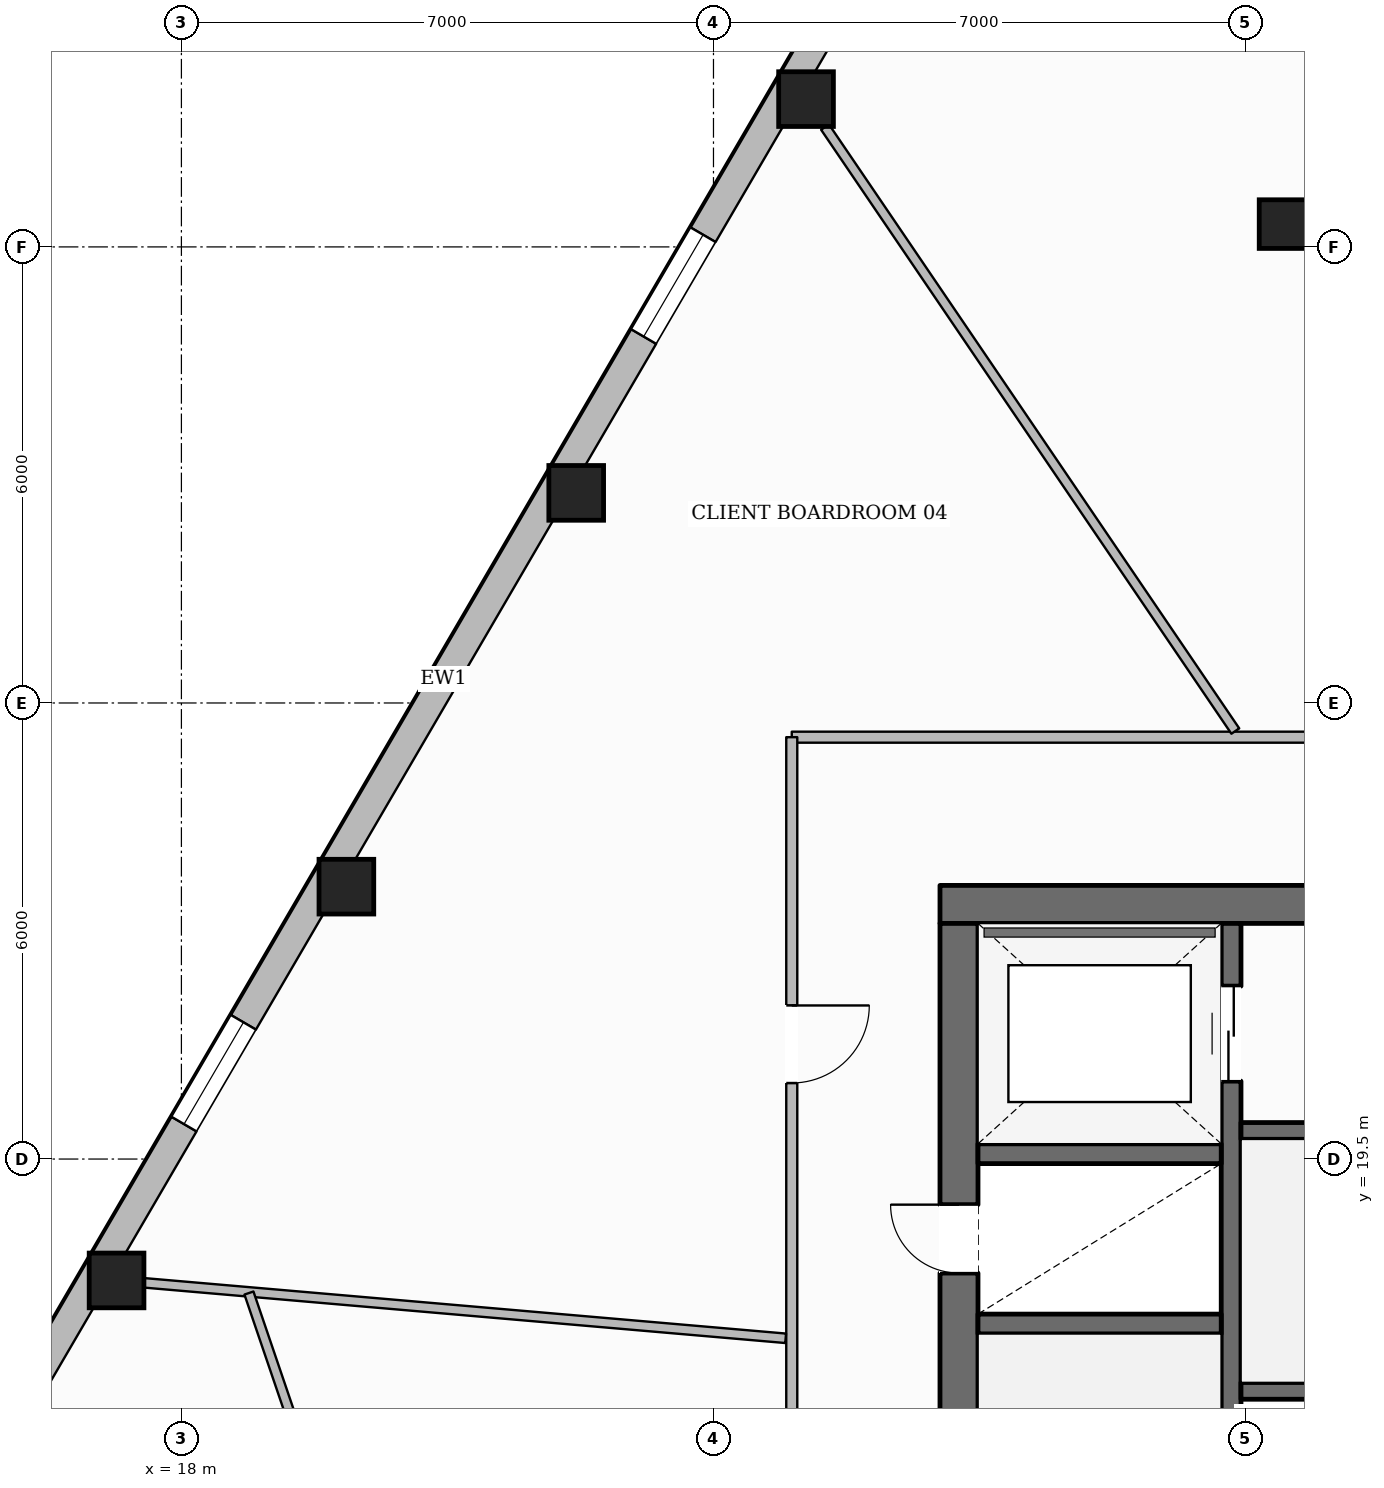
"""IFC4 building model, lengths in metres.
Left out: names, types, materials, properties, quantities, classifications, styles, units other than length and angle.
Written with IfcOpenShell. Run it as: python <this file> out.ifc"""

import sys

from ifc_helpers import new_model, si_unit, direction, frame, frame_2d, origin, origin_2d, place, context, subcontext, project, spatial, rectangle, hollow_rectangle, extrude, element, fill, save


model = new_model("IFC4")
c1 = context("Model", 3, precision=1e-05, world=origin(), true_north=direction((0.0, 1.0)))
c2 = subcontext(c1, "Body", "Model", "MODEL_VIEW")
j1 = project(units=[si_unit("LENGTHUNIT", "METRE"), si_unit("PLANEANGLEUNIT", "RADIAN")], contexts=[c1])
p1 = place(None, origin())
s1 = spatial("IfcSite", under=j1, at=p1, CompositionType="ELEMENT")
p2 = place(p1, origin())
s2 = spatial("IfcBuilding", under=s1, at=p2, CompositionType="ELEMENT")
p3 = place(p2, frame((0.0, 0.0, 127.85)))
s3 = spatial("IfcBuildingStorey", under=s2, at=p3, CompositionType="ELEMENT", Elevation=127.85)
p4 = place(p3, frame((27.98, 22.85, 0.0), z_axis=(0.0, 0.0, 1.0), x_axis=(1.0, 0.0, 0.0)))
e1 = element("IfcWall", 1, at=p4, inside=s3, PredefinedType="SOLIDWALL", context=c2, shape_type="SweptSolid", body=[
    extrude(rectangle(XDim=20.04, YDim=0.5, at=frame_2d((10.02, 0.0))), origin(), (0.0, 0.0, 1.0), 3.6),
])
p5 = place(p4, frame((6.295, 0.0, 0.0)))
e2 = element("IfcOpeningElement", 2, at=p5, cuts=e1, PredefinedType="OPENING", context=c2, shape_type="SweptSolid", body=[
    extrude(rectangle(XDim=1.05, YDim=2.15, at=frame_2d((0.525, 1.075))), frame((0.0, 0.26, 0.0), z_axis=(0.0, -1.0, 0.0), x_axis=(1.0, 0.0, 0.0)), (0.0, 0.0, 1.0), 0.52),
])
p6 = place(p4, frame((12.695, 0.0, 0.0)))
e3 = element("IfcOpeningElement", 3, at=p6, cuts=e1, PredefinedType="OPENING", context=c2, shape_type="SweptSolid", body=[
    extrude(rectangle(XDim=1.05, YDim=2.15, at=frame_2d((0.525, 1.075))), frame((0.0, 0.26, 0.0), z_axis=(0.0, -1.0, 0.0), x_axis=(1.0, 0.0, 0.0)), (0.0, 0.0, 1.0), 0.52),
])
p7 = place(p3, frame((28.23, 9.6, 0.0), z_axis=(0.0, 0.0, 1.0), x_axis=(0.0, 1.0, 0.0)))
e4 = element("IfcWall", 4, at=p7, inside=s3, PredefinedType="SOLIDWALL", context=c2, shape_type="SweptSolid", body=[
    extrude(rectangle(XDim=13.0, YDim=0.5, at=frame_2d((6.5, 0.0))), origin(), (0.0, 0.0, 1.0), 3.6),
])
p8 = place(p7, frame((0.2, 0.0, 0.0)))
e5 = element("IfcOpeningElement", 5, at=p8, cuts=e4, PredefinedType="OPENING", context=c2, shape_type="SweptSolid", body=[
    extrude(rectangle(XDim=1.1, YDim=2.15, at=frame_2d((0.55, 1.075))), frame((0.0, 0.26, 0.0), z_axis=(0.0, -1.0, 0.0), x_axis=(1.0, 0.0, 0.0)), (0.0, 0.0, 1.0), 0.52),
])
p9 = place(p7, frame((8.4, 0.0, 0.0)))
e6 = element("IfcOpeningElement", 6, at=p9, cuts=e4, PredefinedType="OPENING", context=c2, shape_type="SweptSolid", body=[
    extrude(rectangle(XDim=0.9, YDim=2.1, at=frame_2d((0.45, 1.05))), frame((0.0, 0.26, 0.0), z_axis=(0.0, -1.0, 0.0), x_axis=(1.0, 0.0, 0.0)), (0.0, 0.0, 1.0), 0.52),
])
p10 = place(p3, frame((31.81, 9.6, 0.0), z_axis=(0.0, 0.0, 1.0), x_axis=(0.0, 1.0, 0.0)))
e7 = element("IfcWall", 7, at=p10, inside=s3, PredefinedType="SHEAR", context=c2, shape_type="SweptSolid", body=[
    extrude(rectangle(XDim=13.0, YDim=0.26, at=frame_2d((6.5, 0.0))), origin(), (0.0, 0.0, 1.0), 3.6),
])
p11 = place(p10, frame((10.925, 0.0, 0.0)))
e8 = element("IfcOpeningElement", 8, at=p11, cuts=e7, PredefinedType="OPENING", context=c2, shape_type="SweptSolid", body=[
    extrude(rectangle(XDim=1.25, YDim=2.25, at=frame_2d((0.625, 1.125))), frame((0.0, 0.14, 0.0), z_axis=(0.0, -1.0, 0.0), x_axis=(1.0, 0.0, 0.0)), (0.0, 0.0, 1.0), 0.28),
])
for number, where, z_axis, x_axis in (
    (9, (28.48, 17.33, 0.0), (0.0, 0.0, 1.0), (1.0, 0.0, 0.0)),
    (10, (28.48, 19.57, 0.0), (0.0, 0.0, 1.0), (1.0, 0.0, 0.0)),
):
    element("IfcWall", number, at=place(p3, frame(where, z_axis=z_axis, x_axis=x_axis)), inside=s3, PredefinedType="SHEAR", context=c2, shape_type="SweptSolid", body=[
        extrude(rectangle(XDim=3.2, YDim=0.26, at=frame_2d((1.6, 0.0))), origin(), (0.0, 0.0, 1.0), 3.6),
    ])
p12 = place(p3, frame((31.94, 19.87, 0.0), z_axis=(0.0, 0.0, 1.0), x_axis=(1.0, 0.0, 0.0)))
e11 = element("IfcWall", 11, at=p12, inside=s3, PredefinedType="SOLIDWALL", context=c2, shape_type="SweptSolid", body=[
    extrude(rectangle(XDim=12.12, YDim=0.22, at=frame_2d((6.06, 0.0))), origin(), (0.0, 0.0, 1.0), 3.6),
])
p13 = place(p12, frame((6.3, 0.0, 0.0)))
e12 = element("IfcOpeningElement", 12, at=p13, cuts=e11, PredefinedType="OPENING", context=c2, shape_type="SweptSolid", body=[
    extrude(rectangle(XDim=1.1, YDim=2.15, at=frame_2d((0.55, 1.075))), frame((0.0, 0.12, 0.0), z_axis=(0.0, -1.0, 0.0), x_axis=(1.0, 0.0, 0.0)), (0.0, 0.0, 1.0), 0.24),
])
p14 = place(p12, frame((9.51, 0.0, 0.0)))
e13 = element("IfcOpeningElement", 13, at=p14, cuts=e11, PredefinedType="OPENING", context=c2, shape_type="SweptSolid", body=[
    extrude(rectangle(XDim=0.9, YDim=2.1, at=frame_2d((0.45, 1.05))), frame((0.0, 0.12, 0.0), z_axis=(0.0, -1.0, 0.0), x_axis=(1.0, 0.0, 0.0)), (0.0, 0.0, 1.0), 0.24),
])
p15 = place(p3, frame((31.94, 16.45, 0.0), z_axis=(0.0, 0.0, 1.0), x_axis=(1.0, 0.0, 0.0)))
e14 = element("IfcWall", 14, at=p15, inside=s3, PredefinedType="SOLIDWALL", context=c2, shape_type="SweptSolid", body=[
    extrude(rectangle(XDim=12.12, YDim=0.22, at=frame_2d((6.06, 0.0))), origin(), (0.0, 0.0, 1.0), 3.6),
])
for number, where, z_axis, x_axis in (
    (15, (26.218, 33.445, 0.0), (0.0, 0.0, 1.0), (1.0, 0.0, 0.0)),
    (16, (23.194, 28.264, 0.0), (0.0, 0.0, 1.0), (1.0, 0.0, 0.0)),
    (17, (20.17, 23.083, 0.0), (0.0, 0.0, 1.0), (1.0, 0.0, 0.0)),
    (18, (17.147, 17.903, 0.0), (0.0, 0.0, 1.0), (1.0, 0.0, 0.0)),
):
    element("IfcColumn", number, at=place(p3, frame(where, z_axis=z_axis, x_axis=x_axis)), inside=s3, PredefinedType="COLUMN", context=c2, shape_type="SweptSolid", body=[
        extrude(hollow_rectangle(XDim=0.72, YDim=0.72, WallThickness=0.032, at=origin_2d()), origin(), (0.0, 0.0, 1.0), 3.6),
    ])
p16 = place(p3, frame((32.5, 31.8, 0.0), z_axis=(0.0, 0.0, 1.0), x_axis=(1.0, 0.0, 0.0)))
e19 = element("IfcColumn", 19, at=p16, inside=s3, PredefinedType="COLUMN", context=c2, shape_type="SweptSolid", body=[
    extrude(hollow_rectangle(XDim=0.64, YDim=0.64, WallThickness=0.028, at=origin_2d()), origin(), (0.0, 0.0, 1.0), 3.6),
])
p17 = place(p3, frame((13.648, 12.443, 0.0), z_axis=(0.0, 0.0, 1.0), x_axis=(0.504070270963, 0.863662643589, 0.0)))
e20 = element("IfcWall", 20, at=p17, inside=s3, PredefinedType="STANDARD", context=c2, shape_type="SweptSolid", body=[
    extrude(rectangle(XDim=36.948, YDim=0.38, at=frame_2d((18.474, 0.0))), origin(), (0.0, 0.0, 1.0), 3.059),
])
p18 = place(p17, frame((27.111, 0.0, 0.0)))
e21 = element("IfcOpeningElement", 21, at=p18, cuts=e20, PredefinedType="OPENING", context=c2, shape_type="SweptSolid", body=[
    extrude(rectangle(XDim=1.0, YDim=2.2, at=frame_2d((0.5, 1.1))), frame((0.0, 0.2, 0.0), z_axis=(0.0, -1.0, 0.0), x_axis=(1.0, 0.0, 0.0)), (0.0, 0.0, 1.0), 0.4),
])
p19 = place(p17, frame((32.697, 0.0, 0.65)))
e22 = element("IfcOpeningElement", 22, at=p19, cuts=e20, PredefinedType="OPENING", context=c2, shape_type="SweptSolid", body=[
    extrude(rectangle(XDim=1.55, YDim=1.75, at=frame_2d((0.775, 0.875))), frame((0.0, 0.2, 0.0), z_axis=(0.0, -1.0, 0.0), x_axis=(1.0, 0.0, 0.0)), (0.0, 0.0, 1.0), 0.4),
])
p20 = place(p17, frame((20.7, 0.0, 0.65)))
e23 = element("IfcOpeningElement", 23, at=p20, cuts=e20, PredefinedType="OPENING", context=c2, shape_type="SweptSolid", body=[
    extrude(rectangle(XDim=1.55, YDim=1.75, at=frame_2d((0.775, 0.875))), frame((0.0, 0.2, 0.0), z_axis=(0.0, -1.0, 0.0), x_axis=(1.0, 0.0, 0.0)), (0.0, 0.0, 1.0), 0.4),
])
p21 = place(p17, frame((8.704, 0.0, 0.65)))
e24 = element("IfcOpeningElement", 24, at=p21, cuts=e20, PredefinedType="OPENING", context=c2, shape_type="SweptSolid", body=[
    extrude(rectangle(XDim=1.55, YDim=1.75, at=frame_2d((0.775, 0.875))), frame((0.0, 0.2, 0.0), z_axis=(0.0, -1.0, 0.0), x_axis=(1.0, 0.0, 0.0)), (0.0, 0.0, 1.0), 0.4),
])
p22 = place(p17, frame((2.705, 0.0, 0.65)))
e25 = element("IfcOpeningElement", 25, at=p22, cuts=e20, PredefinedType="OPENING", context=c2, shape_type="SweptSolid", body=[
    extrude(rectangle(XDim=1.55, YDim=1.75, at=frame_2d((0.775, 0.875))), frame((0.0, 0.2, 0.0), z_axis=(0.0, -1.0, 0.0), x_axis=(1.0, 0.0, 0.0)), (0.0, 0.0, 1.0), 0.4),
])
p23 = place(p3, frame((49.97, 25.05, 0.0), z_axis=(0.0, 0.0, 1.0), x_axis=(-1.0, 0.0, 0.0)))
e26 = element("IfcWall", 26, at=p23, inside=s3, PredefinedType="PARTITIONING", context=c2, shape_type="SweptSolid", body=[
    extrude(rectangle(XDim=23.94, YDim=0.145, at=frame_2d((11.97, 0.0))), origin(), (0.0, 0.0, 1.0), 3.6),
])
p24 = place(p23, frame((3.582, 0.0, 0.0)))
e27 = element("IfcOpeningElement", 27, at=p24, cuts=e26, PredefinedType="OPENING", context=c2, shape_type="SweptSolid", body=[
    extrude(rectangle(XDim=1.02, YDim=2.15, at=frame_2d((0.51, 1.075))), frame((0.0, 0.083, 0.0), z_axis=(0.0, -1.0, 0.0), x_axis=(1.0, 0.0, 0.0)), (0.0, 0.0, 1.0), 0.165),
])
p25 = place(p23, frame((12.535, 0.0, 0.0)))
e28 = element("IfcOpeningElement", 28, at=p25, cuts=e26, PredefinedType="OPENING", context=c2, shape_type="SweptSolid", body=[
    extrude(rectangle(XDim=1.4, YDim=2.2, at=frame_2d((0.7, 1.1))), frame((0.0, 0.083, 0.0), z_axis=(0.0, -1.0, 0.0), x_axis=(1.0, 0.0, 0.0)), (0.0, 0.0, 1.0), 0.165),
])
p26 = place(p3, frame((26.03, 25.05, 0.0), z_axis=(0.0, 0.0, 1.0), x_axis=(0.0, -1.0, 0.0)))
e29 = element("IfcWall", 29, at=p26, inside=s3, PredefinedType="PARTITIONING", context=c2, shape_type="SweptSolid", body=[
    extrude(rectangle(XDim=17.9, YDim=0.145, at=frame_2d((8.95, 0.0))), origin(), (0.0, 0.0, 1.0), 3.288),
])
p27 = place(p26, frame((3.53, 0.0, 0.0)))
e30 = element("IfcOpeningElement", 30, at=p27, cuts=e29, PredefinedType="OPENING", context=c2, shape_type="SweptSolid", body=[
    extrude(rectangle(XDim=1.02, YDim=2.15, at=frame_2d((0.51, 1.075))), frame((0.0, 0.083, 0.0), z_axis=(0.0, -1.0, 0.0), x_axis=(1.0, 0.0, 0.0)), (0.0, 0.0, 1.0), 0.165),
])
p28 = place(p26, frame((12.309, 0.0, 0.0)))
e31 = element("IfcOpeningElement", 31, at=p28, cuts=e29, PredefinedType="OPENING", context=c2, shape_type="SweptSolid", body=[
    extrude(rectangle(XDim=1.02, YDim=2.15, at=frame_2d((0.51, 1.075))), frame((0.0, 0.083, 0.0), z_axis=(0.0, -1.0, 0.0), x_axis=(1.0, 0.0, 0.0)), (0.0, 0.0, 1.0), 0.165),
])
p29 = place(p3, frame((31.865, 25.131, 0.0), z_axis=(0.0, 0.0, 1.0), x_axis=(-0.561922740885, 0.827189720243, 0.0)))
e32 = element("IfcWall", 32, at=p29, inside=s3, PredefinedType="PARTITIONING", context=c2, shape_type="SweptSolid", body=[
    extrude(rectangle(XDim=9.606, YDim=0.125, at=frame_2d((4.803, 0.0))), origin(), (0.0, 0.0, 1.0), 3.6),
])
p30 = place(p3, frame((25.949, 17.142, 0.0), z_axis=(0.0, 0.0, 1.0), x_axis=(-0.996283209421, 0.086138067226, 0.0)))
e33 = element("IfcWall", 33, at=p30, inside=s3, PredefinedType="PARTITIONING", context=c2, shape_type="SweptSolid", body=[
    extrude(rectangle(XDim=8.466, YDim=0.125, at=frame_2d((4.233, 0.0))), origin(), (0.0, 0.0, 1.0), 3.141),
])
p31 = place(p3, frame((18.889, 17.737, 0.0), z_axis=(0.0, 0.0, 1.0), x_axis=(0.322427692705, -0.946594096209, 0.0)))
e34 = element("IfcWall", 34, at=p31, inside=s3, PredefinedType="PARTITIONING", context=c2, shape_type="SweptSolid", body=[
    extrude(rectangle(XDim=15.848, YDim=0.125, at=frame_2d((7.924, 0.0))), origin(), (0.0, 0.0, 1.0), 3.6),
])
p32 = place(p31, frame((7.528, 0.0, 0.0)))
e35 = element("IfcOpeningElement", 35, at=p32, cuts=e34, PredefinedType="OPENING", context=c2, shape_type="SweptSolid", body=[
    extrude(rectangle(XDim=1.02, YDim=2.15, at=frame_2d((0.51, 1.075))), frame((0.0, 0.073, 0.0), z_axis=(0.0, -1.0, 0.0), x_axis=(1.0, 0.0, 0.0)), (0.0, 0.0, 1.0), 0.145),
])
p33 = place(p20, origin())
e36 = element("IfcWindow", 36, at=p33, inside=s3, PartitioningType="SINGLE_PANEL", PredefinedType="WINDOW", context=c2, shape_type="SweptSolid", body=[
    extrude(rectangle(XDim=1.55, YDim=1.75, at=frame_2d((0.775, 0.875))), frame((0.0, 0.03, 0.0), z_axis=(0.0, -1.0, 0.0), x_axis=(1.0, 0.0, 0.0)), (0.0, 0.0, 1.0), 0.06),
])
fill(e23, e36)
p34 = place(p21, origin())
e37 = element("IfcWindow", 37, at=p34, inside=s3, PartitioningType="SINGLE_PANEL", PredefinedType="WINDOW", context=c2, shape_type="SweptSolid", body=[
    extrude(rectangle(XDim=1.55, YDim=1.75, at=frame_2d((0.775, 0.875))), frame((0.0, 0.03, 0.0), z_axis=(0.0, -1.0, 0.0), x_axis=(1.0, 0.0, 0.0)), (0.0, 0.0, 1.0), 0.06),
])
fill(e24, e37)
p35 = place(p9, origin())
e38 = element("IfcDoor", 38, at=p35, inside=s3, OperationType="SINGLE_SWING_RIGHT", PredefinedType="DOOR", context=c2, shape_type="SweptSolid", body=[
    extrude(rectangle(XDim=0.9, YDim=2.1, at=frame_2d((0.45, 1.05))), frame((0.0, 0.025, 0.0), z_axis=(0.0, -1.0, 0.0), x_axis=(1.0, 0.0, 0.0)), (0.0, 0.0, 1.0), 0.05),
])
fill(e6, e38)
p36 = place(p11, origin())
e39 = element("IfcDoor", 39, at=p36, inside=s3, OperationType="DOUBLE_DOOR_SLIDING", PredefinedType="DOOR", context=c2, shape_type="SweptSolid", body=[
    extrude(rectangle(XDim=1.25, YDim=2.25, at=frame_2d((0.625, 1.125))), frame((0.0, 0.025, 0.0), z_axis=(0.0, -1.0, 0.0), x_axis=(1.0, 0.0, 0.0)), (0.0, 0.0, 1.0), 0.05),
])
fill(e8, e39)
p37 = place(p27, origin())
e40 = element("IfcDoor", 40, at=p37, inside=s3, OperationType="SINGLE_SWING_LEFT", PredefinedType="DOOR", context=c2, shape_type="SweptSolid", body=[
    extrude(rectangle(XDim=1.02, YDim=2.15, at=frame_2d((0.51, 1.075))), frame((0.0, 0.025, 0.0), z_axis=(0.0, -1.0, 0.0), x_axis=(1.0, 0.0, 0.0)), (0.0, 0.0, 1.0), 0.05),
])
fill(e30, e40)
save(model, sys.argv[1])
